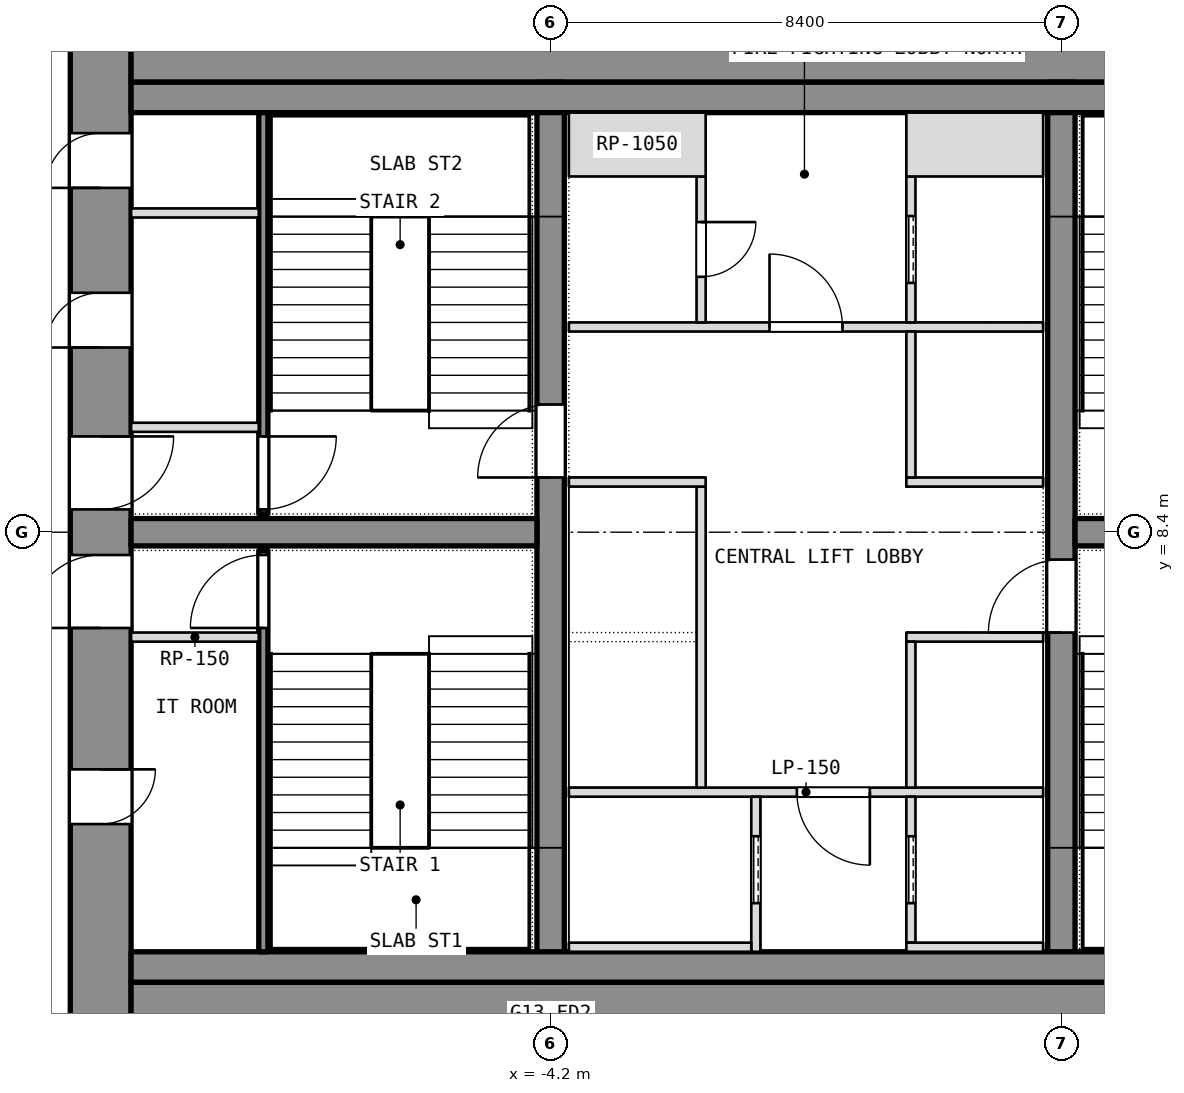
"""IFC4 building model, lengths in metres.
Left out: names, types, materials, properties, quantities, classifications, styles, units other than length and angle.
Written with IfcOpenShell. Run it as: python <this file> out.ifc"""

import sys

from ifc_helpers import new_model, si_unit, direction, frame, frame_2d, origin, place, context, subcontext, project, spatial, rectangle, extrude, element, fill, save


model = new_model("IFC4")
c1 = context("Model", 3, precision=1e-05, world=origin(), true_north=direction((0.0, 1.0)))
c2 = subcontext(c1, "Body", "Model", "MODEL_VIEW")
j1 = project(units=[si_unit("LENGTHUNIT", "METRE"), si_unit("PLANEANGLEUNIT", "RADIAN")], contexts=[c1])
p1 = place(None, origin())
s1 = spatial("IfcSite", under=j1, at=p1, CompositionType="ELEMENT")
p2 = place(p1, origin())
s2 = spatial("IfcBuilding", under=s1, at=p2, CompositionType="ELEMENT")
p3 = place(p2, frame((0.0, 0.0, 148.1)))
s3 = spatial("IfcBuildingStorey", under=s2, at=p3, CompositionType="ELEMENT", Elevation=148.1)
p4 = place(p3, frame((-11.6, 0.0, 0.0), z_axis=(0.0, 0.0, 1.0), x_axis=(0.0, 1.0, 0.0)))
e1 = element("IfcWall", 1, at=p4, inside=s3, PredefinedType="SHEAR", context=c2, shape_type="SweptSolid", body=[
    extrude(rectangle(XDim=16.8, YDim=1.0, at=frame_2d((8.4, 0.0))), origin(), (0.0, 0.0, 1.0), 3.6),
])
p5 = place(p4, frame((3.6, 0.0, 0.0)))
e2 = element("IfcOpeningElement", 2, at=p5, cuts=e1, PredefinedType="OPENING", context=c2, shape_type="SweptSolid", body=[
    extrude(rectangle(XDim=0.9, YDim=2.1, at=frame_2d((0.45, 1.05))), frame((0.0, 0.5, 0.0), z_axis=(0.0, -1.0, 0.0), x_axis=(1.0, 0.0, 0.0)), (0.0, 0.0, 1.0), 1.0),
])
p6 = place(p4, frame((6.825, 0.0, 0.0)))
e3 = element("IfcOpeningElement", 3, at=p6, cuts=e1, PredefinedType="OPENING", context=c2, shape_type="SweptSolid", body=[
    extrude(rectangle(XDim=1.2, YDim=2.1, at=frame_2d((0.6, 1.05))), frame((0.0, 0.5, 0.0), z_axis=(0.0, -1.0, 0.0), x_axis=(1.0, 0.0, 0.0)), (0.0, 0.0, 1.0), 1.0),
])
p7 = place(p4, frame((14.062, 0.0, 0.0)))
e4 = element("IfcOpeningElement", 4, at=p7, cuts=e1, PredefinedType="OPENING", context=c2, shape_type="SweptSolid", body=[
    extrude(rectangle(XDim=0.9, YDim=2.1, at=frame_2d((0.45, 1.05))), frame((0.0, 0.5, 0.0), z_axis=(0.0, -1.0, 0.0), x_axis=(1.0, 0.0, 0.0)), (0.0, 0.0, 1.0), 1.0),
])
p8 = place(p4, frame((11.438, 0.0, 0.0)))
e5 = element("IfcOpeningElement", 5, at=p8, cuts=e1, PredefinedType="OPENING", context=c2, shape_type="SweptSolid", body=[
    extrude(rectangle(XDim=0.9, YDim=2.1, at=frame_2d((0.45, 1.05))), frame((0.0, 0.5, 0.0), z_axis=(0.0, -1.0, 0.0), x_axis=(1.0, 0.0, 0.0)), (0.0, 0.0, 1.0), 1.0),
])
p9 = place(p4, frame((8.775, 0.0, 0.0)))
e6 = element("IfcOpeningElement", 6, at=p9, cuts=e1, PredefinedType="OPENING", context=c2, shape_type="SweptSolid", body=[
    extrude(rectangle(XDim=1.2, YDim=2.1, at=frame_2d((0.6, 1.05))), frame((0.0, 0.5, 0.0), z_axis=(0.0, -1.0, 0.0), x_axis=(1.0, 0.0, 0.0)), (0.0, 0.0, 1.0), 1.0),
])
for number, where, z_axis, x_axis in (
    (7, (-11.1, 0.5, 0.0), (0.0, 0.0, 1.0), (1.0, 0.0, 0.0)),
    (8, (-11.1, 16.3, 0.0), (0.0, 0.0, 1.0), (1.0, 0.0, 0.0)),
):
    element("IfcWall", number, at=place(p3, frame(where, z_axis=z_axis, x_axis=x_axis)), inside=s3, PredefinedType="SHEAR", context=c2, shape_type="SweptSolid", body=[
        extrude(rectangle(XDim=22.2, YDim=1.0, at=frame_2d((11.1, 0.0))), origin(), (0.0, 0.0, 1.0), 3.6),
    ])
p10 = place(p3, frame((-4.2, 1.0, 0.0), z_axis=(0.0, 0.0, 1.0), x_axis=(0.0, 1.0, 0.0)))
e9 = element("IfcWall", 9, at=p10, inside=s3, PredefinedType="SHEAR", context=c2, shape_type="SweptSolid", body=[
    extrude(rectangle(XDim=14.8, YDim=0.45, at=frame_2d((7.4, 0.0))), origin(), (0.0, 0.0, 1.0), 3.6),
])
p11 = place(p10, frame((8.3, 0.0, 0.0)))
e10 = element("IfcOpeningElement", 10, at=p11, cuts=e9, PredefinedType="OPENING", context=c2, shape_type="SweptSolid", body=[
    extrude(rectangle(XDim=1.2, YDim=2.1, at=frame_2d((0.6, 1.05))), frame((0.0, 0.225, 0.0), z_axis=(0.0, -1.0, 0.0), x_axis=(1.0, 0.0, 0.0)), (0.0, 0.0, 1.0), 0.45),
])
p12 = place(p3, frame((4.2, 1.0, 0.0), z_axis=(0.0, 0.0, 1.0), x_axis=(0.0, 1.0, 0.0)))
e11 = element("IfcWall", 11, at=p12, inside=s3, PredefinedType="SHEAR", context=c2, shape_type="SweptSolid", body=[
    extrude(rectangle(XDim=14.8, YDim=0.45, at=frame_2d((7.4, 0.0))), origin(), (0.0, 0.0, 1.0), 3.6),
])
p13 = place(p12, frame((5.75, 0.0, 0.0)))
e12 = element("IfcOpeningElement", 12, at=p13, cuts=e11, PredefinedType="OPENING", context=c2, shape_type="SweptSolid", body=[
    extrude(rectangle(XDim=1.2, YDim=2.1, at=frame_2d((0.6, 1.05))), frame((0.0, 0.225, 0.0), z_axis=(0.0, -1.0, 0.0), x_axis=(1.0, 0.0, 0.0)), (0.0, 0.0, 1.0), 0.45),
])
for number, where, z_axis, x_axis in (
    (13, (-11.1, 8.4, 0.0), (0.0, 0.0, 1.0), (1.0, 0.0, 0.0)),
    (14, (4.425, 8.4, 0.0), (0.0, 0.0, 1.0), (1.0, 0.0, 0.0)),
):
    element("IfcWall", number, at=place(p3, frame(where, z_axis=z_axis, x_axis=x_axis)), inside=s3, PredefinedType="SHEAR", context=c2, shape_type="SweptSolid", body=[
        extrude(rectangle(XDim=6.675, YDim=0.45, at=frame_2d((3.337, 0.0))), origin(), (0.0, 0.0, 1.0), 3.6),
    ])
for number, where, z_axis, x_axis in (
    (15, (-11.1, 1.25, 0.0), (0.0, 0.0, 1.0), (1.0, 0.0, 0.0)),
    (16, (-11.1, 15.55, 0.0), (0.0, 0.0, 1.0), (1.0, 0.0, 0.0)),
):
    element("IfcWall", number, at=place(p3, frame(where, z_axis=z_axis, x_axis=x_axis)), inside=s3, PredefinedType="PARTITIONING", context=c2, shape_type="SweptSolid", body=[
        extrude(rectangle(XDim=22.2, YDim=0.5, at=frame_2d((11.1, 0.0))), origin(), (0.0, 0.0, 1.0), 3.34),
    ])
p14 = place(p3, frame((-8.925, 1.5, 0.0), z_axis=(0.0, 0.0, 1.0), x_axis=(0.0, 1.0, 0.0)))
e17 = element("IfcWall", 17, at=p14, inside=s3, PredefinedType="SHEAR", context=c2, shape_type="SweptSolid", body=[
    extrude(rectangle(XDim=6.6, YDim=0.15, at=frame_2d((3.3, 0.0))), origin(), (0.0, 0.0, 1.0), 3.34),
])
p15 = place(p14, frame((5.325, 0.0, 0.0)))
e18 = element("IfcOpeningElement", 18, at=p15, cuts=e17, PredefinedType="OPENING", context=c2, shape_type="SweptSolid", body=[
    extrude(rectangle(XDim=1.2, YDim=2.1, at=frame_2d((0.6, 1.05))), frame((0.0, 0.075, 0.0), z_axis=(0.0, -1.0, 0.0), x_axis=(1.0, 0.0, 0.0)), (0.0, 0.0, 1.0), 0.15),
])
p16 = place(p3, frame((-11.1, 6.675, 0.0), z_axis=(0.0, 0.0, 1.0), x_axis=(1.0, 0.0, 0.0)))
e19 = element("IfcWall", 19, at=p16, inside=s3, PredefinedType="PARTITIONING", context=c2, shape_type="SweptSolid", body=[
    extrude(rectangle(XDim=2.1, YDim=0.15, at=frame_2d((1.05, 0.0))), origin(), (0.0, 0.0, 1.0), 3.34),
])
p17 = place(p3, frame((-8.925, 8.7, 0.0), z_axis=(0.0, 0.0, 1.0), x_axis=(0.0, 1.0, 0.0)))
e20 = element("IfcWall", 20, at=p17, inside=s3, PredefinedType="SHEAR", context=c2, shape_type="SweptSolid", body=[
    extrude(rectangle(XDim=6.6, YDim=0.15, at=frame_2d((3.3, 0.0))), origin(), (0.0, 0.0, 1.0), 3.34),
])
p18 = place(p17, frame((0.075, 0.0, 0.0)))
e21 = element("IfcOpeningElement", 21, at=p18, cuts=e20, PredefinedType="OPENING", context=c2, shape_type="SweptSolid", body=[
    extrude(rectangle(XDim=1.2, YDim=2.1, at=frame_2d((0.6, 1.05))), frame((0.0, 0.075, 0.0), z_axis=(0.0, -1.0, 0.0), x_axis=(1.0, 0.0, 0.0)), (0.0, 0.0, 1.0), 0.15),
])
for number, where, z_axis, x_axis in (
    (22, (-11.1, 10.125, 0.0), (0.0, 0.0, 1.0), (1.0, 0.0, 0.0)),
    (23, (-11.1, 13.65, 0.0), (0.0, 0.0, 1.0), (1.0, 0.0, 0.0)),
):
    element("IfcWall", number, at=place(p3, frame(where, z_axis=z_axis, x_axis=x_axis)), inside=s3, PredefinedType="PARTITIONING", context=c2, shape_type="SweptSolid", body=[
        extrude(rectangle(XDim=2.1, YDim=0.15, at=frame_2d((1.05, 0.0))), origin(), (0.0, 0.0, 1.0), 3.34),
    ])
p19 = place(p3, frame((-3.9, 4.125, 0.0), z_axis=(0.0, 0.0, 1.0), x_axis=(1.0, 0.0, 0.0)))
e24 = element("IfcWall", 24, at=p19, inside=s3, PredefinedType="PARTITIONING", context=c2, shape_type="SweptSolid", body=[
    extrude(rectangle(XDim=7.8, YDim=0.15, at=frame_2d((3.9, 0.0))), origin(), (0.0, 0.0, 1.0), 3.34),
])
p20 = place(p19, frame((3.75, 0.0, 0.0)))
e25 = element("IfcOpeningElement", 25, at=p20, cuts=e24, PredefinedType="OPENING", context=c2, shape_type="SweptSolid", body=[
    extrude(rectangle(XDim=1.2, YDim=2.1, at=frame_2d((0.6, 1.05))), frame((0.0, 0.075, 0.0), z_axis=(0.0, -1.0, 0.0), x_axis=(1.0, 0.0, 0.0)), (0.0, 0.0, 1.0), 0.15),
])
p21 = place(p3, frame((-3.9, 11.775, 0.0), z_axis=(0.0, 0.0, 1.0), x_axis=(1.0, 0.0, 0.0)))
e26 = element("IfcWall", 26, at=p21, inside=s3, PredefinedType="PARTITIONING", context=c2, shape_type="SweptSolid", body=[
    extrude(rectangle(XDim=7.8, YDim=0.15, at=frame_2d((3.9, 0.0))), origin(), (0.0, 0.0, 1.0), 3.34),
])
p22 = place(p21, frame((3.3, 0.0, 0.0)))
e27 = element("IfcOpeningElement", 27, at=p22, cuts=e26, PredefinedType="OPENING", context=c2, shape_type="SweptSolid", body=[
    extrude(rectangle(XDim=1.2, YDim=2.1, at=frame_2d((0.6, 1.05))), frame((0.0, 0.075, 0.0), z_axis=(0.0, -1.0, 0.0), x_axis=(1.0, 0.0, 0.0)), (0.0, 0.0, 1.0), 0.15),
])
p23 = place(p3, frame((-0.825, 1.5, 0.0), z_axis=(0.0, 0.0, 1.0), x_axis=(0.0, 1.0, 0.0)))
e28 = element("IfcWall", 28, at=p23, inside=s3, PredefinedType="SHEAR", context=c2, shape_type="SweptSolid", body=[
    extrude(rectangle(XDim=2.55, YDim=0.15, at=frame_2d((1.275, 0.0))), origin(), (0.0, 0.0, 1.0), 3.6),
])
p24 = place(p23, frame((0.8, 0.0, 0.0)))
e29 = element("IfcOpeningElement", 29, at=p24, cuts=e28, PredefinedType="OPENING", context=c2, shape_type="SweptSolid", body=[
    extrude(rectangle(XDim=1.1, YDim=2.1, at=frame_2d((0.55, 1.05))), frame((0.0, 0.075, 0.0), z_axis=(0.0, -1.0, 0.0), x_axis=(1.0, 0.0, 0.0)), (0.0, 0.0, 1.0), 0.15),
])
p25 = place(p3, frame((-3.9, 1.575, 0.0), z_axis=(0.0, 0.0, 1.0), x_axis=(1.0, 0.0, 0.0)))
e30 = element("IfcWall", 30, at=p25, inside=s3, PredefinedType="SHEAR", context=c2, shape_type="SweptSolid", body=[
    extrude(rectangle(XDim=3.0, YDim=0.15, at=frame_2d((1.5, 0.0))), origin(), (0.0, 0.0, 1.0), 3.6),
])
p26 = place(p3, frame((-1.725, 4.2, 0.0), z_axis=(0.0, 0.0, 1.0), x_axis=(0.0, 1.0, 0.0)))
e31 = element("IfcWall", 31, at=p26, inside=s3, PredefinedType="SHEAR", context=c2, shape_type="SweptSolid", body=[
    extrude(rectangle(XDim=4.95, YDim=0.15, at=frame_2d((2.475, 0.0))), origin(), (0.0, 0.0, 1.0), 3.6),
])
p27 = place(p3, frame((-3.9, 9.225, 0.0), z_axis=(0.0, 0.0, 1.0), x_axis=(1.0, 0.0, 0.0)))
e32 = element("IfcWall", 32, at=p27, inside=s3, PredefinedType="SHEAR", context=c2, shape_type="SweptSolid", body=[
    extrude(rectangle(XDim=2.25, YDim=0.15, at=frame_2d((1.125, 0.0))), origin(), (0.0, 0.0, 1.0), 3.6),
])
p28 = place(p3, frame((-1.725, 11.85, 0.0), z_axis=(0.0, 0.0, 1.0), x_axis=(0.0, 1.0, 0.0)))
e33 = element("IfcWall", 33, at=p28, inside=s3, PredefinedType="PARTITIONING", context=c2, shape_type="SweptSolid", body=[
    extrude(rectangle(XDim=2.4, YDim=0.15, at=frame_2d((1.2, 0.0))), origin(), (0.0, 0.0, 1.0), 3.34),
])
p29 = place(p28, frame((0.75, 0.0, 0.0)))
e34 = element("IfcOpeningElement", 34, at=p29, cuts=e33, PredefinedType="OPENING", context=c2, shape_type="SweptSolid", body=[
    extrude(rectangle(XDim=0.9, YDim=2.1, at=frame_2d((0.45, 1.05))), frame((0.0, 0.075, 0.0), z_axis=(0.0, -1.0, 0.0), x_axis=(1.0, 0.0, 0.0)), (0.0, 0.0, 1.0), 0.15),
])
p30 = place(p3, frame((-3.9, 14.775, 0.0), z_axis=(0.0, 0.0, 1.0), x_axis=(1.0, 0.0, 0.0)))
e35 = element("IfcWall", 35, at=p30, inside=s3, PredefinedType="PARTITIONING", context=c2, shape_type="SweptSolid", body=[
    extrude(rectangle(XDim=2.25, YDim=1.05, at=frame_2d((1.125, 0.0))), origin(), (0.0, 0.0, 1.0), 3.34),
])
p31 = place(p3, frame((1.725, 1.65, 0.0), z_axis=(0.0, 0.0, 1.0), x_axis=(0.0, 1.0, 0.0)))
e36 = element("IfcWall", 36, at=p31, inside=s3, PredefinedType="SHEAR", context=c2, shape_type="SweptSolid", body=[
    extrude(rectangle(XDim=2.4, YDim=0.15, at=frame_2d((1.2, 0.0))), origin(), (0.0, 0.0, 1.0), 3.6),
])
p32 = place(p31, frame((0.65, 0.0, 0.0)))
e37 = element("IfcOpeningElement", 37, at=p32, cuts=e36, PredefinedType="OPENING", context=c2, shape_type="SweptSolid", body=[
    extrude(rectangle(XDim=1.1, YDim=2.1, at=frame_2d((0.55, 1.05))), frame((0.0, 0.075, 0.0), z_axis=(0.0, -1.0, 0.0), x_axis=(1.0, 0.0, 0.0)), (0.0, 0.0, 1.0), 0.15),
])
p33 = place(p3, frame((1.65, 1.575, 0.0), z_axis=(0.0, 0.0, 1.0), x_axis=(1.0, 0.0, 0.0)))
e38 = element("IfcWall", 38, at=p33, inside=s3, PredefinedType="SHEAR", context=c2, shape_type="SweptSolid", body=[
    extrude(rectangle(XDim=2.25, YDim=0.15, at=frame_2d((1.125, 0.0))), origin(), (0.0, 0.0, 1.0), 3.6),
])
p34 = place(p3, frame((1.725, 11.85, 0.0), z_axis=(0.0, 0.0, 1.0), x_axis=(0.0, 1.0, 0.0)))
e39 = element("IfcWall", 39, at=p34, inside=s3, PredefinedType="SHEAR", context=c2, shape_type="SweptSolid", body=[
    extrude(rectangle(XDim=2.4, YDim=0.15, at=frame_2d((1.2, 0.0))), origin(), (0.0, 0.0, 1.0), 3.6),
])
p35 = place(p34, frame((0.65, 0.0, 0.0)))
e40 = element("IfcOpeningElement", 40, at=p35, cuts=e39, PredefinedType="OPENING", context=c2, shape_type="SweptSolid", body=[
    extrude(rectangle(XDim=1.1, YDim=2.1, at=frame_2d((0.55, 1.05))), frame((0.0, 0.075, 0.0), z_axis=(0.0, -1.0, 0.0), x_axis=(1.0, 0.0, 0.0)), (0.0, 0.0, 1.0), 0.15),
])
p36 = place(p3, frame((1.65, 14.775, 0.0), z_axis=(0.0, 0.0, 1.0), x_axis=(1.0, 0.0, 0.0)))
e41 = element("IfcWall", 41, at=p36, inside=s3, PredefinedType="SHEAR", context=c2, shape_type="SweptSolid", body=[
    extrude(rectangle(XDim=2.25, YDim=1.05, at=frame_2d((1.125, 0.0))), origin(), (0.0, 0.0, 1.0), 3.6),
])
for number, where, z_axis, x_axis in (
    (42, (1.65, 6.675, 0.0), (0.0, 0.0, 1.0), (1.0, 0.0, 0.0)),
    (43, (1.65, 9.225, 0.0), (0.0, 0.0, 1.0), (1.0, 0.0, 0.0)),
):
    element("IfcWall", number, at=place(p3, frame(where, z_axis=z_axis, x_axis=x_axis)), inside=s3, PredefinedType="SHEAR", context=c2, shape_type="SweptSolid", body=[
        extrude(rectangle(XDim=2.25, YDim=0.15, at=frame_2d((1.125, 0.0))), origin(), (0.0, 0.0, 1.0), 3.6),
    ])
p37 = place(p3, frame((1.725, 4.2, 0.0), z_axis=(0.0, 0.0, 1.0), x_axis=(0.0, 1.0, 0.0)))
e44 = element("IfcWall", 44, at=p37, inside=s3, PredefinedType="SHEAR", context=c2, shape_type="SweptSolid", body=[
    extrude(rectangle(XDim=2.4, YDim=0.15, at=frame_2d((1.2, 0.0))), origin(), (0.0, 0.0, 1.0), 3.6),
])
p38 = place(p3, frame((1.725, 9.3, 0.0), z_axis=(0.0, 0.0, 1.0), x_axis=(0.0, 1.0, 0.0)))
e45 = element("IfcWall", 45, at=p38, inside=s3, PredefinedType="SHEAR", context=c2, shape_type="SweptSolid", body=[
    extrude(rectangle(XDim=2.4, YDim=0.15, at=frame_2d((1.2, 0.0))), origin(), (0.0, 0.0, 1.0), 3.6),
])
p39 = place(p5, origin())
e46 = element("IfcDoor", 46, at=p39, inside=s3, OperationType="SINGLE_SWING_LEFT", PredefinedType="DOOR", context=c2, shape_type="SweptSolid", body=[
    extrude(rectangle(XDim=0.9, YDim=2.1, at=frame_2d((0.45, 1.05))), frame((0.0, 0.025, 0.0), z_axis=(0.0, -1.0, 0.0), x_axis=(1.0, 0.0, 0.0)), (0.0, 0.0, 1.0), 0.05),
])
fill(e2, e46)
p40 = place(p6, origin())
e47 = element("IfcDoor", 47, at=p40, inside=s3, OperationType="SINGLE_SWING_LEFT", PredefinedType="DOOR", context=c2, shape_type="SweptSolid", body=[
    extrude(rectangle(XDim=1.2, YDim=2.1, at=frame_2d((0.6, 1.05))), frame((0.0, 0.025, 0.0), z_axis=(0.0, -1.0, 0.0), x_axis=(1.0, 0.0, 0.0)), (0.0, 0.0, 1.0), 0.05),
])
fill(e3, e47)
p41 = place(p15, origin())
e48 = element("IfcDoor", 48, at=p41, inside=s3, OperationType="SINGLE_SWING_LEFT", PredefinedType="DOOR", context=c2, shape_type="SweptSolid", body=[
    extrude(rectangle(XDim=1.2, YDim=2.1, at=frame_2d((0.6, 1.05))), frame((0.0, 0.025, 0.0), z_axis=(0.0, -1.0, 0.0), x_axis=(1.0, 0.0, 0.0)), (0.0, 0.0, 1.0), 0.05),
])
fill(e18, e48)
p42 = place(p7, origin())
e49 = element("IfcDoor", 49, at=p42, inside=s3, OperationType="SINGLE_SWING_LEFT", PredefinedType="DOOR", context=c2, shape_type="SweptSolid", body=[
    extrude(rectangle(XDim=0.9, YDim=2.1, at=frame_2d((0.45, 1.05))), frame((0.0, 0.025, 0.0), z_axis=(0.0, -1.0, 0.0), x_axis=(1.0, 0.0, 0.0)), (0.0, 0.0, 1.0), 0.05),
])
fill(e4, e49)
p43 = place(p8, origin())
e50 = element("IfcDoor", 50, at=p43, inside=s3, OperationType="SINGLE_SWING_LEFT", PredefinedType="DOOR", context=c2, shape_type="SweptSolid", body=[
    extrude(rectangle(XDim=0.9, YDim=2.1, at=frame_2d((0.45, 1.05))), frame((0.0, 0.025, 0.0), z_axis=(0.0, -1.0, 0.0), x_axis=(1.0, 0.0, 0.0)), (0.0, 0.0, 1.0), 0.05),
])
fill(e5, e50)
p44 = place(p9, origin())
e51 = element("IfcDoor", 51, at=p44, inside=s3, OperationType="SINGLE_SWING_LEFT", PredefinedType="DOOR", context=c2, shape_type="SweptSolid", body=[
    extrude(rectangle(XDim=1.2, YDim=2.1, at=frame_2d((0.6, 1.05))), frame((0.0, 0.025, 0.0), z_axis=(0.0, -1.0, 0.0), x_axis=(1.0, 0.0, 0.0)), (0.0, 0.0, 1.0), 0.05),
])
fill(e6, e51)
p45 = place(p18, origin())
e52 = element("IfcDoor", 52, at=p45, inside=s3, OperationType="SINGLE_SWING_LEFT", PredefinedType="DOOR", context=c2, shape_type="SweptSolid", body=[
    extrude(rectangle(XDim=1.2, YDim=2.1, at=frame_2d((0.6, 1.05))), frame((0.0, 0.025, 0.0), z_axis=(0.0, -1.0, 0.0), x_axis=(1.0, 0.0, 0.0)), (0.0, 0.0, 1.0), 0.05),
])
fill(e21, e52)
p46 = place(p24, origin())
e53 = element("IfcDoor", 53, at=p46, inside=s3, OperationType="SLIDING_TO_LEFT", PredefinedType="DOOR", context=c2, shape_type="SweptSolid", body=[
    extrude(rectangle(XDim=1.1, YDim=2.1, at=frame_2d((0.55, 1.05))), frame((0.0, 0.025, 0.0), z_axis=(0.0, -1.0, 0.0), x_axis=(1.0, 0.0, 0.0)), (0.0, 0.0, 1.0), 0.05),
])
fill(e29, e53)
p47 = place(p32, origin())
e54 = element("IfcDoor", 54, at=p47, inside=s3, OperationType="SLIDING_TO_LEFT", PredefinedType="DOOR", context=c2, shape_type="SweptSolid", body=[
    extrude(rectangle(XDim=1.1, YDim=2.1, at=frame_2d((0.55, 1.05))), frame((0.0, 0.025, 0.0), z_axis=(0.0, -1.0, 0.0), x_axis=(1.0, 0.0, 0.0)), (0.0, 0.0, 1.0), 0.05),
])
fill(e37, e54)
p48 = place(p35, origin())
e55 = element("IfcDoor", 55, at=p48, inside=s3, OperationType="SLIDING_TO_LEFT", PredefinedType="DOOR", context=c2, shape_type="SweptSolid", body=[
    extrude(rectangle(XDim=1.1, YDim=2.1, at=frame_2d((0.55, 1.05))), frame((0.0, 0.025, 0.0), z_axis=(0.0, -1.0, 0.0), x_axis=(1.0, 0.0, 0.0)), (0.0, 0.0, 1.0), 0.05),
])
fill(e40, e55)
p49 = place(p20, origin())
e56 = element("IfcDoor", 56, at=p49, inside=s3, OperationType="SINGLE_SWING_LEFT", PredefinedType="DOOR", context=c2, shape_type="SweptSolid", body=[
    extrude(rectangle(XDim=1.2, YDim=2.1, at=frame_2d((0.6, 1.05))), frame((0.0, 0.025, 0.0), z_axis=(0.0, -1.0, 0.0), x_axis=(1.0, 0.0, 0.0)), (0.0, 0.0, 1.0), 0.05),
])
fill(e25, e56)
p50 = place(p22, origin())
e57 = element("IfcDoor", 57, at=p50, inside=s3, OperationType="SINGLE_SWING_LEFT", PredefinedType="DOOR", context=c2, shape_type="SweptSolid", body=[
    extrude(rectangle(XDim=1.2, YDim=2.1, at=frame_2d((0.6, 1.05))), frame((0.0, 0.025, 0.0), z_axis=(0.0, -1.0, 0.0), x_axis=(1.0, 0.0, 0.0)), (0.0, 0.0, 1.0), 0.05),
])
fill(e27, e57)
p51 = place(p29, origin())
e58 = element("IfcDoor", 58, at=p51, inside=s3, OperationType="SINGLE_SWING_LEFT", PredefinedType="DOOR", context=c2, shape_type="SweptSolid", body=[
    extrude(rectangle(XDim=0.9, YDim=2.1, at=frame_2d((0.45, 1.05))), frame((0.0, 0.025, 0.0), z_axis=(0.0, -1.0, 0.0), x_axis=(1.0, 0.0, 0.0)), (0.0, 0.0, 1.0), 0.05),
])
fill(e34, e58)
p52 = place(p11, origin())
e59 = element("IfcDoor", 59, at=p52, inside=s3, OperationType="SINGLE_SWING_LEFT", PredefinedType="DOOR", context=c2, shape_type="SweptSolid", body=[
    extrude(rectangle(XDim=1.2, YDim=2.1, at=frame_2d((0.6, 1.05))), frame((0.0, 0.025, 0.0), z_axis=(0.0, -1.0, 0.0), x_axis=(1.0, 0.0, 0.0)), (0.0, 0.0, 1.0), 0.05),
])
fill(e10, e59)
p53 = place(p13, origin())
e60 = element("IfcDoor", 60, at=p53, inside=s3, OperationType="SINGLE_SWING_LEFT", PredefinedType="DOOR", context=c2, shape_type="SweptSolid", body=[
    extrude(rectangle(XDim=1.2, YDim=2.1, at=frame_2d((0.6, 1.05))), frame((0.0, 0.025, 0.0), z_axis=(0.0, -1.0, 0.0), x_axis=(1.0, 0.0, 0.0)), (0.0, 0.0, 1.0), 0.05),
])
fill(e12, e60)
save(model, sys.argv[1])
